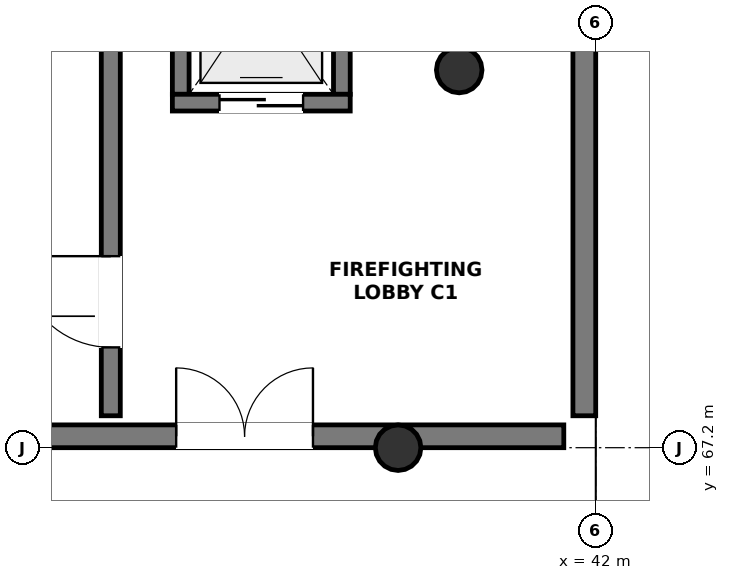
"""IFC4 building model, lengths in metres.
Left out: names, types, materials, properties, quantities, classifications, styles, units other than length and angle.
Written with IfcOpenShell. Run it as: python <this file> out.ifc"""

import sys

from ifc_helpers import new_model, si_unit, direction, frame, frame_2d, origin, origin_2d, place, context, subcontext, project, spatial, rectangle, circle, extrude, element, fill, save


model = new_model("IFC4")
c1 = context("Model", 3, precision=1e-05, world=origin(), true_north=direction((0.0, 1.0)))
c2 = subcontext(c1, "Body", "Model", "MODEL_VIEW")
j1 = project(units=[si_unit("LENGTHUNIT", "METRE"), si_unit("PLANEANGLEUNIT", "RADIAN")], contexts=[c1])
p1 = place(None, origin())
s1 = spatial("IfcSite", under=j1, at=p1, CompositionType="ELEMENT")
p2 = place(p1, origin())
s2 = spatial("IfcBuilding", under=s1, at=p2, CompositionType="ELEMENT")
p3 = place(p2, frame((0.0, 0.0, 18.3)))
s3 = spatial("IfcBuildingStorey", under=s2, at=p3, CompositionType="ELEMENT", Elevation=18.3)
for number, where, z_axis, x_axis in (
    (1, (40.204, 72.169, 0.0), (0.0, 0.0, 1.0), (1.0, 0.0, 0.0)),
    (2, (39.4, 67.2, 0.0), (0.0, 0.0, 1.0), (1.0, 0.0, 0.0)),
):
    element("IfcColumn", number, at=place(p3, frame(where, z_axis=z_axis, x_axis=x_axis)), inside=s3, PredefinedType="COLUMN", context=c2, shape_type="SweptSolid", body=[
        extrude(circle(Radius=0.3, at=origin_2d()), origin(), (0.0, 0.0, 1.0), 2.45),
    ])
p4 = place(p3, frame((25.62, 67.35, 0.0), z_axis=(0.0, 0.0, 1.0), x_axis=(1.0, 0.0, 0.0)))
e3 = element("IfcWall", 3, at=p4, inside=s3, PredefinedType="SHEAR", context=c2, shape_type="SweptSolid", body=[
    extrude(rectangle(XDim=15.96, YDim=0.3, at=frame_2d((7.98, 0.0))), origin(), (0.0, 0.0, 1.0), 3.04),
])
p5 = place(p4, frame((10.86, 0.0, 0.0)))
e4 = element("IfcOpeningElement", 4, at=p5, cuts=e3, PredefinedType="OPENING", context=c2, shape_type="SweptSolid", body=[
    extrude(rectangle(XDim=1.8, YDim=2.2, at=frame_2d((0.9, 1.1))), frame((0.0, 0.162, 0.0), z_axis=(0.0, -1.0, 0.0), x_axis=(1.0, 0.0, 0.0)), (0.0, 0.0, 1.0), 0.324),
])
p6 = place(p3, frame((41.85, 67.62, 0.0), z_axis=(0.0, 0.0, 1.0), x_axis=(0.0, 1.0, 0.0)))
e5 = element("IfcWall", 5, at=p6, inside=s3, PredefinedType="SHEAR", context=c2, shape_type="SweptSolid", body=[
    extrude(rectangle(XDim=7.56, YDim=0.3, at=frame_2d((3.78, 0.0))), origin(), (0.0, 0.0, 1.0), 3.04),
])
p7 = place(p3, frame((35.62, 67.62, 0.0), z_axis=(0.0, 0.0, 1.0), x_axis=(0.0, 1.0, 0.0)))
e6 = element("IfcWall", 6, at=p7, inside=s3, PredefinedType="SHEAR", context=c2, shape_type="SweptSolid", body=[
    extrude(rectangle(XDim=7.56, YDim=0.25, at=frame_2d((3.78, 0.0))), origin(), (0.0, 0.0, 1.0), 3.04),
])
p8 = place(p7, frame((0.9, 0.0, 0.0)))
e7 = element("IfcOpeningElement", 7, at=p8, cuts=e6, PredefinedType="OPENING", context=c2, shape_type="SweptSolid", body=[
    extrude(rectangle(XDim=1.2, YDim=2.2, at=frame_2d((0.6, 1.1))), frame((0.0, 0.137, 0.0), z_axis=(0.0, -1.0, 0.0), x_axis=(1.0, 0.0, 0.0)), (0.0, 0.0, 1.0), 0.274),
])
for number, where, z_axis, x_axis in (
    (8, (36.54, 71.85, 0.0), (0.0, 0.0, 1.0), (0.0, 1.0, 0.0)),
    (9, (38.66, 71.85, 0.0), (0.0, 0.0, 1.0), (0.0, 1.0, 0.0)),
):
    element("IfcWall", number, at=place(p3, frame(where, z_axis=z_axis, x_axis=x_axis)), inside=s3, PredefinedType="SOLIDWALL", context=c2, shape_type="SweptSolid", body=[
        extrude(rectangle(XDim=2.7, YDim=0.22, at=frame_2d((1.35, 0.0))), origin(), (0.0, 0.0, 1.0), 3.04),
    ])
p9 = place(p3, frame((36.43, 71.74, 0.0), z_axis=(0.0, 0.0, 1.0), x_axis=(1.0, 0.0, 0.0)))
e10 = element("IfcWall", 10, at=p9, inside=s3, PredefinedType="SOLIDWALL", context=c2, shape_type="SweptSolid", body=[
    extrude(rectangle(XDim=2.34, YDim=0.22, at=frame_2d((1.17, 0.0))), origin(), (0.0, 0.0, 1.0), 3.04),
])
p10 = place(p9, frame((0.62, 0.0, 0.0)))
e11 = element("IfcOpeningElement", 11, at=p10, cuts=e10, PredefinedType="OPENING", context=c2, shape_type="SweptSolid", body=[
    extrude(rectangle(XDim=1.1, YDim=2.15, at=frame_2d((0.55, 1.075))), frame((0.0, 0.122, 0.0), z_axis=(0.0, -1.0, 0.0), x_axis=(1.0, 0.0, 0.0)), (0.0, 0.0, 1.0), 0.244),
])
p11 = place(p5, origin())
e12 = element("IfcDoor", 12, at=p11, inside=s3, OperationType="DOUBLE_DOOR_SINGLE_SWING", PredefinedType="DOOR", context=c2, shape_type="SweptSolid", body=[
    extrude(rectangle(XDim=1.8, YDim=2.2, at=frame_2d((0.9, 1.1))), frame((0.0, 0.025, 0.0), z_axis=(0.0, -1.0, 0.0), x_axis=(1.0, 0.0, 0.0)), (0.0, 0.0, 1.0), 0.05),
])
fill(e4, e12)
p12 = place(p8, origin())
e13 = element("IfcDoor", 13, at=p12, inside=s3, OperationType="SINGLE_SWING_RIGHT", PredefinedType="DOOR", context=c2, shape_type="SweptSolid", body=[
    extrude(rectangle(XDim=1.2, YDim=2.2, at=frame_2d((0.6, 1.1))), frame((0.0, 0.025, 0.0), z_axis=(0.0, -1.0, 0.0), x_axis=(1.0, 0.0, 0.0)), (0.0, 0.0, 1.0), 0.05),
])
fill(e7, e13)
p13 = place(p10, origin())
e14 = element("IfcDoor", 14, at=p13, inside=s3, OperationType="DOUBLE_DOOR_SLIDING", PredefinedType="DOOR", context=c2, shape_type="SweptSolid", body=[
    extrude(rectangle(XDim=1.1, YDim=2.15, at=frame_2d((0.55, 1.075))), frame((0.0, 0.025, 0.0), z_axis=(0.0, -1.0, 0.0), x_axis=(1.0, 0.0, 0.0)), (0.0, 0.0, 1.0), 0.05),
])
fill(e11, e14)
save(model, sys.argv[1])
